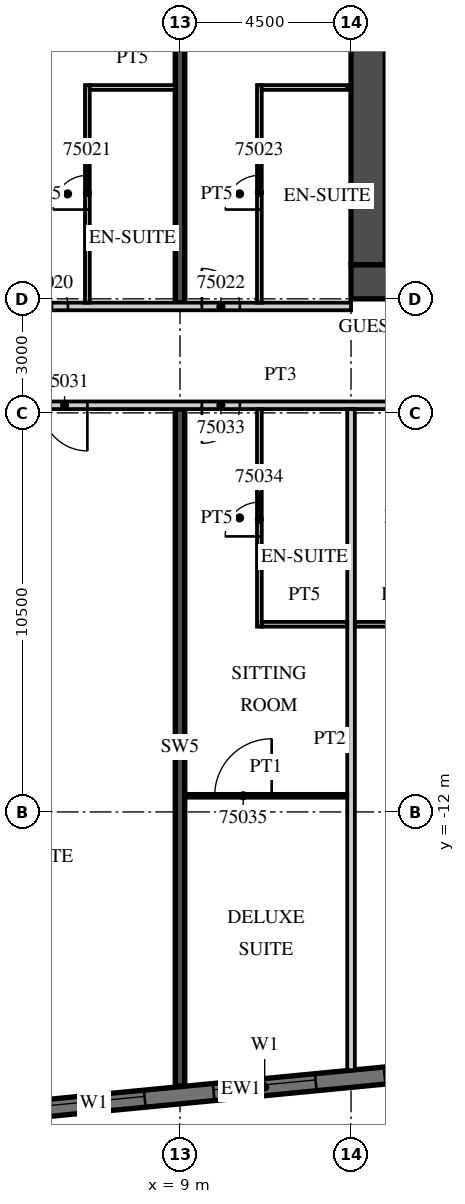
"""IFC4 building model, lengths in metres.
Left out: names, types, materials, properties, quantities, classifications, styles, units other than length and angle.
Written with IfcOpenShell. Run it as: python <this file> out.ifc"""

import sys

from ifc_helpers import new_model, si_unit, direction, frame, frame_2d, origin, place, context, subcontext, project, spatial, rectangle, extrude, element, fill, save


model = new_model("IFC4")
c1 = context("Model", 3, precision=1e-05, world=origin(), true_north=direction((0.0, 1.0)))
c2 = subcontext(c1, "Body", "Model", "MODEL_VIEW")
j1 = project(units=[si_unit("LENGTHUNIT", "METRE"), si_unit("PLANEANGLEUNIT", "RADIAN")], contexts=[c1])
p1 = place(None, origin())
s1 = spatial("IfcSite", under=j1, at=p1, CompositionType="ELEMENT")
p2 = place(p1, origin())
s2 = spatial("IfcBuilding", under=s1, at=p2, CompositionType="ELEMENT")
p3 = place(p2, frame((0.0, 0.0, 298.2)))
s3 = spatial("IfcBuildingStorey", under=s2, at=p3, CompositionType="ELEMENT", Elevation=298.2)
p4 = place(p3, frame((9.0, -19.207, 0.0), z_axis=(0.0, 0.0, 1.0), x_axis=(0.0, 1.0, 0.0)))
e1 = element("IfcWall", 1, at=p4, inside=s3, PredefinedType="SHEAR", context=c2, shape_type="SweptSolid", body=[
    extrude(rectangle(XDim=17.807, YDim=0.25, at=frame_2d((8.904, 0.0))), origin(), (0.0, 0.0, 1.0), 3.3),
])
p5 = place(p3, frame((9.0, 1.4, 0.0), z_axis=(0.0, 0.0, 1.0), x_axis=(0.0, 1.0, 0.0)))
e2 = element("IfcWall", 2, at=p5, inside=s3, PredefinedType="SHEAR", context=c2, shape_type="SweptSolid", body=[
    extrude(rectangle(XDim=18.629, YDim=0.25, at=frame_2d((9.315, 0.0))), origin(), (0.0, 0.0, 1.0), 3.3),
])
p6 = place(p3, frame((-13.521, -21.624, 0.0), z_axis=(0.0, 0.0, 1.0), x_axis=(0.995396186218, 0.095845878695, 0.0)))
e3 = element("IfcWall", 3, at=p6, inside=s3, PredefinedType="SOLIDWALL", context=c2, shape_type="SweptSolid", body=[
    extrude(rectangle(XDim=48.481, YDim=0.45, at=frame_2d((24.241, 0.0))), origin(), (0.0, 0.0, 1.0), 3.02),
])
p7 = place(p6, frame((0.91, 0.0, 0.45)))
e4 = element("IfcOpeningElement", 4, at=p7, cuts=e3, PredefinedType="OPENING", context=c2, shape_type="SweptSolid", body=[
    extrude(rectangle(XDim=2.7, YDim=2.25, at=frame_2d((1.35, 1.125))), frame((0.0, 0.235, 0.0), z_axis=(0.0, -1.0, 0.0), x_axis=(1.0, 0.0, 0.0)), (0.0, 0.0, 1.0), 0.47),
])
p8 = place(p6, frame((5.431, 0.0, 0.45)))
e5 = element("IfcOpeningElement", 5, at=p8, cuts=e3, PredefinedType="OPENING", context=c2, shape_type="SweptSolid", body=[
    extrude(rectangle(XDim=2.7, YDim=2.25, at=frame_2d((1.35, 1.125))), frame((0.0, 0.235, 0.0), z_axis=(0.0, -1.0, 0.0), x_axis=(1.0, 0.0, 0.0)), (0.0, 0.0, 1.0), 0.47),
])
p9 = place(p6, frame((9.952, 0.0, 0.45)))
e6 = element("IfcOpeningElement", 6, at=p9, cuts=e3, PredefinedType="OPENING", context=c2, shape_type="SweptSolid", body=[
    extrude(rectangle(XDim=2.7, YDim=2.25, at=frame_2d((1.35, 1.125))), frame((0.0, 0.235, 0.0), z_axis=(0.0, -1.0, 0.0), x_axis=(1.0, 0.0, 0.0)), (0.0, 0.0, 1.0), 0.47),
])
p10 = place(p6, frame((14.473, 0.0, 0.45)))
e7 = element("IfcOpeningElement", 7, at=p10, cuts=e3, PredefinedType="OPENING", context=c2, shape_type="SweptSolid", body=[
    extrude(rectangle(XDim=2.7, YDim=2.25, at=frame_2d((1.35, 1.125))), frame((0.0, 0.235, 0.0), z_axis=(0.0, -1.0, 0.0), x_axis=(1.0, 0.0, 0.0)), (0.0, 0.0, 1.0), 0.47),
])
p11 = place(p6, frame((18.994, 0.0, 0.45)))
e8 = element("IfcOpeningElement", 8, at=p11, cuts=e3, PredefinedType="OPENING", context=c2, shape_type="SweptSolid", body=[
    extrude(rectangle(XDim=2.7, YDim=2.25, at=frame_2d((1.35, 1.125))), frame((0.0, 0.235, 0.0), z_axis=(0.0, -1.0, 0.0), x_axis=(1.0, 0.0, 0.0)), (0.0, 0.0, 1.0), 0.47),
])
p12 = place(p6, frame((23.514, 0.0, 0.45)))
e9 = element("IfcOpeningElement", 9, at=p12, cuts=e3, PredefinedType="OPENING", context=c2, shape_type="SweptSolid", body=[
    extrude(rectangle(XDim=2.7, YDim=2.25, at=frame_2d((1.35, 1.125))), frame((0.0, 0.235, 0.0), z_axis=(0.0, -1.0, 0.0), x_axis=(1.0, 0.0, 0.0)), (0.0, 0.0, 1.0), 0.47),
])
p13 = place(p6, frame((28.035, 0.0, 0.45)))
e10 = element("IfcOpeningElement", 10, at=p13, cuts=e3, PredefinedType="OPENING", context=c2, shape_type="SweptSolid", body=[
    extrude(rectangle(XDim=2.7, YDim=2.25, at=frame_2d((1.35, 1.125))), frame((0.0, 0.235, 0.0), z_axis=(0.0, -1.0, 0.0), x_axis=(1.0, 0.0, 0.0)), (0.0, 0.0, 1.0), 0.47),
])
p14 = place(p6, frame((32.556, 0.0, 0.45)))
e11 = element("IfcOpeningElement", 11, at=p14, cuts=e3, PredefinedType="OPENING", context=c2, shape_type="SweptSolid", body=[
    extrude(rectangle(XDim=2.7, YDim=2.25, at=frame_2d((1.35, 1.125))), frame((0.0, 0.235, 0.0), z_axis=(0.0, -1.0, 0.0), x_axis=(1.0, 0.0, 0.0)), (0.0, 0.0, 1.0), 0.47),
])
p15 = place(p6, frame((37.077, 0.0, 0.45)))
e12 = element("IfcOpeningElement", 12, at=p15, cuts=e3, PredefinedType="OPENING", context=c2, shape_type="SweptSolid", body=[
    extrude(rectangle(XDim=2.7, YDim=2.25, at=frame_2d((1.35, 1.125))), frame((0.0, 0.235, 0.0), z_axis=(0.0, -1.0, 0.0), x_axis=(1.0, 0.0, 0.0)), (0.0, 0.0, 1.0), 0.47),
])
p16 = place(p6, frame((41.598, 0.0, 0.45)))
e13 = element("IfcOpeningElement", 13, at=p16, cuts=e3, PredefinedType="OPENING", context=c2, shape_type="SweptSolid", body=[
    extrude(rectangle(XDim=2.7, YDim=2.25, at=frame_2d((1.35, 1.125))), frame((0.0, 0.235, 0.0), z_axis=(0.0, -1.0, 0.0), x_axis=(1.0, 0.0, 0.0)), (0.0, 0.0, 1.0), 0.47),
])
p17 = place(p3, frame((-39.909, 1.3, 0.0), z_axis=(0.0, 0.0, 1.0), x_axis=(1.0, 0.0, 0.0)))
e14 = element("IfcWall", 14, at=p17, inside=s3, PredefinedType="PARTITIONING", context=c2, shape_type="SweptSolid", body=[
    extrude(rectangle(XDim=53.409, YDim=0.2, at=frame_2d((26.705, 0.0))), origin(), (0.0, 0.0, 1.0), 3.02),
])
p18 = place(p17, frame((0.255, 0.0, 0.0)))
e15 = element("IfcOpeningElement", 15, at=p18, cuts=e14, PredefinedType="OPENING", context=c2, shape_type="SweptSolid", body=[
    extrude(rectangle(XDim=0.9, YDim=2.1, at=frame_2d((0.45, 1.05))), frame((0.0, 0.11, 0.0), z_axis=(0.0, -1.0, 0.0), x_axis=(1.0, 0.0, 0.0)), (0.0, 0.0, 1.0), 0.22),
])
p19 = place(p17, frame((4.484, 0.0, 0.0)))
e16 = element("IfcOpeningElement", 16, at=p19, cuts=e14, PredefinedType="OPENING", context=c2, shape_type="SweptSolid", body=[
    extrude(rectangle(XDim=1.0, YDim=2.1, at=frame_2d((0.5, 1.05))), frame((0.0, 0.11, 0.0), z_axis=(0.0, -1.0, 0.0), x_axis=(1.0, 0.0, 0.0)), (0.0, 0.0, 1.0), 0.22),
])
p20 = place(p17, frame((11.334, 0.0, 0.0)))
e17 = element("IfcOpeningElement", 17, at=p20, cuts=e14, PredefinedType="OPENING", context=c2, shape_type="SweptSolid", body=[
    extrude(rectangle(XDim=1.0, YDim=2.1, at=frame_2d((0.5, 1.05))), frame((0.0, 0.11, 0.0), z_axis=(0.0, -1.0, 0.0), x_axis=(1.0, 0.0, 0.0)), (0.0, 0.0, 1.0), 0.22),
])
p21 = place(p17, frame((15.347, 0.0, 0.0)))
e18 = element("IfcOpeningElement", 18, at=p21, cuts=e14, PredefinedType="OPENING", context=c2, shape_type="SweptSolid", body=[
    extrude(rectangle(XDim=1.2, YDim=2.1, at=frame_2d((0.6, 1.05))), frame((0.0, 0.11, 0.0), z_axis=(0.0, -1.0, 0.0), x_axis=(1.0, 0.0, 0.0)), (0.0, 0.0, 1.0), 0.22),
])
p22 = place(p17, frame((24.859, 0.0, 0.0)))
e19 = element("IfcOpeningElement", 19, at=p22, cuts=e14, PredefinedType="OPENING", context=c2, shape_type="SweptSolid", body=[
    extrude(rectangle(XDim=1.0, YDim=2.1, at=frame_2d((0.5, 1.05))), frame((0.0, 0.11, 0.0), z_axis=(0.0, -1.0, 0.0), x_axis=(1.0, 0.0, 0.0)), (0.0, 0.0, 1.0), 0.22),
])
p23 = place(p17, frame((26.959, 0.0, 0.0)))
e20 = element("IfcOpeningElement", 20, at=p23, cuts=e14, PredefinedType="OPENING", context=c2, shape_type="SweptSolid", body=[
    extrude(rectangle(XDim=1.0, YDim=2.1, at=frame_2d((0.5, 1.05))), frame((0.0, 0.11, 0.0), z_axis=(0.0, -1.0, 0.0), x_axis=(1.0, 0.0, 0.0)), (0.0, 0.0, 1.0), 0.22),
])
p24 = place(p17, frame((33.346, 0.0, 0.0)))
e21 = element("IfcOpeningElement", 21, at=p24, cuts=e14, PredefinedType="OPENING", context=c2, shape_type="SweptSolid", body=[
    extrude(rectangle(XDim=1.2, YDim=2.1, at=frame_2d((0.6, 1.05))), frame((0.0, 0.11, 0.0), z_axis=(0.0, -1.0, 0.0), x_axis=(1.0, 0.0, 0.0)), (0.0, 0.0, 1.0), 0.22),
])
p25 = place(p17, frame((42.859, 0.0, 0.0)))
e22 = element("IfcOpeningElement", 22, at=p25, cuts=e14, PredefinedType="OPENING", context=c2, shape_type="SweptSolid", body=[
    extrude(rectangle(XDim=1.0, YDim=2.1, at=frame_2d((0.5, 1.05))), frame((0.0, 0.11, 0.0), z_axis=(0.0, -1.0, 0.0), x_axis=(1.0, 0.0, 0.0)), (0.0, 0.0, 1.0), 0.22),
])
p26 = place(p17, frame((44.959, 0.0, 0.0)))
e23 = element("IfcOpeningElement", 23, at=p26, cuts=e14, PredefinedType="OPENING", context=c2, shape_type="SweptSolid", body=[
    extrude(rectangle(XDim=1.0, YDim=2.1, at=frame_2d((0.5, 1.05))), frame((0.0, 0.11, 0.0), z_axis=(0.0, -1.0, 0.0), x_axis=(1.0, 0.0, 0.0)), (0.0, 0.0, 1.0), 0.22),
])
p27 = place(p17, frame((49.484, 0.0, 0.0)))
e24 = element("IfcOpeningElement", 24, at=p27, cuts=e14, PredefinedType="OPENING", context=c2, shape_type="SweptSolid", body=[
    extrude(rectangle(XDim=1.0, YDim=2.1, at=frame_2d((0.5, 1.05))), frame((0.0, 0.11, 0.0), z_axis=(0.0, -1.0, 0.0), x_axis=(1.0, 0.0, 0.0)), (0.0, 0.0, 1.0), 0.22),
])
p28 = place(p3, frame((6.562, 1.4, 0.0), z_axis=(0.0, 0.0, 1.0), x_axis=(0.0, 1.0, 0.0)))
e25 = element("IfcWall", 25, at=p28, inside=s3, PredefinedType="PARTITIONING", context=c2, shape_type="SweptSolid", body=[
    extrude(rectangle(XDim=5.725, YDim=0.125, at=frame_2d((2.863, 0.0))), origin(), (0.0, 0.0, 1.0), 3.02),
])
p29 = place(p28, frame((2.45, 0.0, 0.0)))
e26 = element("IfcOpeningElement", 26, at=p29, cuts=e25, PredefinedType="OPENING", context=c2, shape_type="SweptSolid", body=[
    extrude(rectangle(XDim=0.9, YDim=2.1, at=frame_2d((0.45, 1.05))), frame((0.0, 0.073, 0.0), z_axis=(0.0, -1.0, 0.0), x_axis=(1.0, 0.0, 0.0)), (0.0, 0.0, 1.0), 0.145),
])
p30 = place(p3, frame((6.625, 7.062, 0.0), z_axis=(0.0, 0.0, 1.0), x_axis=(1.0, 0.0, 0.0)))
e27 = element("IfcWall", 27, at=p30, inside=s3, PredefinedType="PARTITIONING", context=c2, shape_type="SweptSolid", body=[
    extrude(rectangle(XDim=2.25, YDim=0.125, at=frame_2d((1.125, 0.0))), origin(), (0.0, 0.0, 1.0), 3.02),
])
p31 = place(p3, frame((11.088, 1.4, 0.0), z_axis=(0.0, 0.0, 1.0), x_axis=(0.0, 1.0, 0.0)))
e28 = element("IfcWall", 28, at=p31, inside=s3, PredefinedType="PARTITIONING", context=c2, shape_type="SweptSolid", body=[
    extrude(rectangle(XDim=5.725, YDim=0.125, at=frame_2d((2.863, 0.0))), origin(), (0.0, 0.0, 1.0), 3.02),
])
p32 = place(p31, frame((2.45, 0.0, 0.0)))
e29 = element("IfcOpeningElement", 29, at=p32, cuts=e28, PredefinedType="OPENING", context=c2, shape_type="SweptSolid", body=[
    extrude(rectangle(XDim=0.9, YDim=2.1, at=frame_2d((0.45, 1.05))), frame((0.0, 0.073, 0.0), z_axis=(0.0, -1.0, 0.0), x_axis=(1.0, 0.0, 0.0)), (0.0, 0.0, 1.0), 0.145),
])
p33 = place(p3, frame((11.15, 7.062, 0.0), z_axis=(0.0, 0.0, 1.0), x_axis=(1.0, 0.0, 0.0)))
e30 = element("IfcWall", 30, at=p33, inside=s3, PredefinedType="PARTITIONING", context=c2, shape_type="SweptSolid", body=[
    extrude(rectangle(XDim=2.25, YDim=0.125, at=frame_2d((1.125, 0.0))), origin(), (0.0, 0.0, 1.0), 3.02),
])
p34 = place(p3, frame((-13.5, -1.3, 0.0), z_axis=(0.0, 0.0, 1.0), x_axis=(1.0, 0.0, 0.0)))
e31 = element("IfcWall", 31, at=p34, inside=s3, PredefinedType="PARTITIONING", context=c2, shape_type="SweptSolid", body=[
    extrude(rectangle(XDim=50.293, YDim=0.2, at=frame_2d((25.146, 0.0))), origin(), (0.0, 0.0, 1.0), 3.02),
])
p35 = place(p34, frame((2.925, 0.0, 0.0)))
e32 = element("IfcOpeningElement", 32, at=p35, cuts=e31, PredefinedType="OPENING", context=c2, shape_type="SweptSolid", body=[
    extrude(rectangle(XDim=1.0, YDim=2.1, at=frame_2d((0.5, 1.05))), frame((0.0, 0.11, 0.0), z_axis=(0.0, -1.0, 0.0), x_axis=(1.0, 0.0, 0.0)), (0.0, 0.0, 1.0), 0.22),
])
p36 = place(p34, frame((7.45, 0.0, 0.0)))
e33 = element("IfcOpeningElement", 33, at=p36, cuts=e31, PredefinedType="OPENING", context=c2, shape_type="SweptSolid", body=[
    extrude(rectangle(XDim=1.0, YDim=2.1, at=frame_2d((0.5, 1.05))), frame((0.0, 0.11, 0.0), z_axis=(0.0, -1.0, 0.0), x_axis=(1.0, 0.0, 0.0)), (0.0, 0.0, 1.0), 0.22),
])
p37 = place(p34, frame((9.55, 0.0, 0.0)))
e34 = element("IfcOpeningElement", 34, at=p37, cuts=e31, PredefinedType="OPENING", context=c2, shape_type="SweptSolid", body=[
    extrude(rectangle(XDim=1.0, YDim=2.1, at=frame_2d((0.5, 1.05))), frame((0.0, 0.11, 0.0), z_axis=(0.0, -1.0, 0.0), x_axis=(1.0, 0.0, 0.0)), (0.0, 0.0, 1.0), 0.22),
])
p38 = place(p34, frame((18.862, 0.0, 0.0)))
e35 = element("IfcOpeningElement", 35, at=p38, cuts=e31, PredefinedType="OPENING", context=c2, shape_type="SweptSolid", body=[
    extrude(rectangle(XDim=1.2, YDim=2.1, at=frame_2d((0.6, 1.05))), frame((0.0, 0.11, 0.0), z_axis=(0.0, -1.0, 0.0), x_axis=(1.0, 0.0, 0.0)), (0.0, 0.0, 1.0), 0.22),
])
p39 = place(p34, frame((23.075, 0.0, 0.0)))
e36 = element("IfcOpeningElement", 36, at=p39, cuts=e31, PredefinedType="OPENING", context=c2, shape_type="SweptSolid", body=[
    extrude(rectangle(XDim=1.0, YDim=2.1, at=frame_2d((0.5, 1.05))), frame((0.0, 0.11, 0.0), z_axis=(0.0, -1.0, 0.0), x_axis=(1.0, 0.0, 0.0)), (0.0, 0.0, 1.0), 0.22),
])
p40 = place(p34, frame((29.925, 0.0, 0.0)))
e37 = element("IfcOpeningElement", 37, at=p40, cuts=e31, PredefinedType="OPENING", context=c2, shape_type="SweptSolid", body=[
    extrude(rectangle(XDim=1.0, YDim=2.1, at=frame_2d((0.5, 1.05))), frame((0.0, 0.11, 0.0), z_axis=(0.0, -1.0, 0.0), x_axis=(1.0, 0.0, 0.0)), (0.0, 0.0, 1.0), 0.22),
])
p41 = place(p34, frame((33.938, 0.0, 0.0)))
e38 = element("IfcOpeningElement", 38, at=p41, cuts=e31, PredefinedType="OPENING", context=c2, shape_type="SweptSolid", body=[
    extrude(rectangle(XDim=1.2, YDim=2.1, at=frame_2d((0.6, 1.05))), frame((0.0, 0.11, 0.0), z_axis=(0.0, -1.0, 0.0), x_axis=(1.0, 0.0, 0.0)), (0.0, 0.0, 1.0), 0.22),
])
p42 = place(p34, frame((43.45, 0.0, 0.0)))
e39 = element("IfcOpeningElement", 39, at=p42, cuts=e31, PredefinedType="OPENING", context=c2, shape_type="SweptSolid", body=[
    extrude(rectangle(XDim=1.0, YDim=2.1, at=frame_2d((0.5, 1.05))), frame((0.0, 0.11, 0.0), z_axis=(0.0, -1.0, 0.0), x_axis=(1.0, 0.0, 0.0)), (0.0, 0.0, 1.0), 0.22),
])
p43 = place(p34, frame((45.55, 0.0, 0.0)))
e40 = element("IfcOpeningElement", 40, at=p43, cuts=e31, PredefinedType="OPENING", context=c2, shape_type="SweptSolid", body=[
    extrude(rectangle(XDim=1.0, YDim=2.1, at=frame_2d((0.5, 1.05))), frame((0.0, 0.11, 0.0), z_axis=(0.0, -1.0, 0.0), x_axis=(1.0, 0.0, 0.0)), (0.0, 0.0, 1.0), 0.22),
])
p44 = place(p3, frame((13.5, -18.796, 0.0), z_axis=(0.0, 0.0, 1.0), x_axis=(0.0, 1.0, 0.0)))
e41 = element("IfcWall", 41, at=p44, inside=s3, PredefinedType="PARTITIONING", context=c2, shape_type="SweptSolid", body=[
    extrude(rectangle(XDim=17.396, YDim=0.2, at=frame_2d((8.698, 0.0))), origin(), (0.0, 0.0, 1.0), 3.02),
])
p45 = place(p3, frame((11.088, -7.125, 0.0), z_axis=(0.0, 0.0, 1.0), x_axis=(0.0, 1.0, 0.0)))
e42 = element("IfcWall", 42, at=p45, inside=s3, PredefinedType="PARTITIONING", context=c2, shape_type="SweptSolid", body=[
    extrude(rectangle(XDim=5.725, YDim=0.125, at=frame_2d((2.863, 0.0))), origin(), (0.0, 0.0, 1.0), 3.02),
])
p46 = place(p45, frame((2.375, 0.0, 0.0)))
e43 = element("IfcOpeningElement", 43, at=p46, cuts=e42, PredefinedType="OPENING", context=c2, shape_type="SweptSolid", body=[
    extrude(rectangle(XDim=0.9, YDim=2.1, at=frame_2d((0.45, 1.05))), frame((0.0, 0.073, 0.0), z_axis=(0.0, -1.0, 0.0), x_axis=(1.0, 0.0, 0.0)), (0.0, 0.0, 1.0), 0.145),
])
p47 = place(p3, frame((11.15, -7.062, 0.0), z_axis=(0.0, 0.0, 1.0), x_axis=(1.0, 0.0, 0.0)))
e44 = element("IfcWall", 44, at=p47, inside=s3, PredefinedType="PARTITIONING", context=c2, shape_type="SweptSolid", body=[
    extrude(rectangle(XDim=2.25, YDim=0.125, at=frame_2d((1.125, 0.0))), origin(), (0.0, 0.0, 1.0), 3.02),
])
p48 = place(p3, frame((9.125, -11.575, 0.0), z_axis=(0.0, 0.0, 1.0), x_axis=(1.0, 0.0, 0.0)))
e45 = element("IfcWall", 45, at=p48, inside=s3, PredefinedType="PARTITIONING", context=c2, shape_type="SweptSolid", body=[
    extrude(rectangle(XDim=4.275, YDim=0.1, at=frame_2d((2.137, 0.0))), origin(), (0.0, 0.0, 1.0), 3.02),
])
p49 = place(p48, frame((0.787, 0.0, 0.0)))
e46 = element("IfcOpeningElement", 46, at=p49, cuts=e45, PredefinedType="OPENING", context=c2, shape_type="SweptSolid", body=[
    extrude(rectangle(XDim=1.5, YDim=2.1, at=frame_2d((0.75, 1.05))), frame((0.0, 0.06, 0.0), z_axis=(0.0, -1.0, 0.0), x_axis=(1.0, 0.0, 0.0)), (0.0, 0.0, 1.0), 0.12),
])
p50 = place(p3, frame((13.6, -7.062, 0.0), z_axis=(0.0, 0.0, 1.0), x_axis=(1.0, 0.0, 0.0)))
e47 = element("IfcWall", 47, at=p50, inside=s3, PredefinedType="PARTITIONING", context=c2, shape_type="SweptSolid", body=[
    extrude(rectangle(XDim=2.25, YDim=0.125, at=frame_2d((1.125, 0.0))), origin(), (0.0, 0.0, 1.0), 3.02),
])
p51 = place(p3, frame((13.5, 1.95, 0.0), z_axis=(0.0, 0.0, 1.0), x_axis=(1.0, 0.0, 0.0)))
e48 = element("IfcWall", 48, at=p51, inside=s3, PredefinedType="SHEAR", context=c2, shape_type="SweptSolid", body=[
    extrude(rectangle(XDim=18.0, YDim=0.9, at=frame_2d((9.0, 0.0))), origin(), (0.0, 0.0, 1.0), 3.02),
])
p52 = place(p51, frame((1.475, 0.0, 0.0)))
e49 = element("IfcOpeningElement", 49, at=p52, cuts=e48, PredefinedType="OPENING", context=c2, shape_type="SweptSolid", body=[
    extrude(rectangle(XDim=1.8, YDim=2.1, at=frame_2d((0.9, 1.05))), frame((0.0, 0.46, 0.0), z_axis=(0.0, -1.0, 0.0), x_axis=(1.0, 0.0, 0.0)), (0.0, 0.0, 1.0), 0.92),
])
p53 = place(p3, frame((13.95, 2.4, 0.0), z_axis=(0.0, 0.0, 1.0), x_axis=(0.0, 1.0, 0.0)))
e50 = element("IfcWall", 50, at=p53, inside=s3, PredefinedType="SHEAR", context=c2, shape_type="SweptSolid", body=[
    extrude(rectangle(XDim=12.2, YDim=0.9, at=frame_2d((6.1, 0.0))), origin(), (0.0, 0.0, 1.0), 3.02),
])
p54 = place(p11, origin())
e51 = element("IfcWindow", 51, at=p54, inside=s3, PartitioningType="SINGLE_PANEL", PredefinedType="WINDOW", context=c2, shape_type="SweptSolid", body=[
    extrude(rectangle(XDim=2.7, YDim=2.25, at=frame_2d((1.35, 1.125))), frame((0.0, 0.09, 0.0), z_axis=(0.0, -1.0, 0.0), x_axis=(1.0, 0.0, 0.0)), (0.0, 0.0, 1.0), 0.06),
])
fill(e8, e51)
p55 = place(p12, origin())
e52 = element("IfcWindow", 52, at=p55, inside=s3, PartitioningType="SINGLE_PANEL", PredefinedType="WINDOW", context=c2, shape_type="SweptSolid", body=[
    extrude(rectangle(XDim=2.7, YDim=2.25, at=frame_2d((1.35, 1.125))), frame((0.0, 0.09, 0.0), z_axis=(0.0, -1.0, 0.0), x_axis=(1.0, 0.0, 0.0)), (0.0, 0.0, 1.0), 0.06),
])
fill(e9, e52)
p56 = place(p13, origin())
e53 = element("IfcWindow", 53, at=p56, inside=s3, PartitioningType="SINGLE_PANEL", PredefinedType="WINDOW", context=c2, shape_type="SweptSolid", body=[
    extrude(rectangle(XDim=2.7, YDim=2.25, at=frame_2d((1.35, 1.125))), frame((0.0, 0.09, 0.0), z_axis=(0.0, -1.0, 0.0), x_axis=(1.0, 0.0, 0.0)), (0.0, 0.0, 1.0), 0.06),
])
fill(e10, e53)
p57 = place(p26, origin())
e54 = element("IfcDoor", 54, at=p57, inside=s3, OperationType="SINGLE_SWING_LEFT", PredefinedType="DOOR", context=c2, shape_type="SweptSolid", body=[
    extrude(rectangle(XDim=1.0, YDim=2.1, at=frame_2d((0.5, 1.05))), frame((0.0, 0.025, 0.0), z_axis=(0.0, -1.0, 0.0), x_axis=(1.0, 0.0, 0.0)), (0.0, 0.0, 1.0), 0.05),
])
fill(e23, e54)
p58 = place(p29, origin())
e55 = element("IfcDoor", 55, at=p58, inside=s3, OperationType="SINGLE_SWING_LEFT", PredefinedType="DOOR", context=c2, shape_type="SweptSolid", body=[
    extrude(rectangle(XDim=0.9, YDim=2.1, at=frame_2d((0.45, 1.05))), frame((0.0, 0.025, 0.0), z_axis=(0.0, -1.0, 0.0), x_axis=(1.0, 0.0, 0.0)), (0.0, 0.0, 1.0), 0.05),
])
fill(e26, e55)
p59 = place(p27, origin())
e56 = element("IfcDoor", 56, at=p59, inside=s3, OperationType="SINGLE_SWING_LEFT", PredefinedType="DOOR", context=c2, shape_type="SweptSolid", body=[
    extrude(rectangle(XDim=1.0, YDim=2.1, at=frame_2d((0.5, 1.05))), frame((0.0, 0.025, 0.0), z_axis=(0.0, -1.0, 0.0), x_axis=(1.0, 0.0, 0.0)), (0.0, 0.0, 1.0), 0.05),
])
fill(e24, e56)
p60 = place(p32, origin())
e57 = element("IfcDoor", 57, at=p60, inside=s3, OperationType="SINGLE_SWING_LEFT", PredefinedType="DOOR", context=c2, shape_type="SweptSolid", body=[
    extrude(rectangle(XDim=0.9, YDim=2.1, at=frame_2d((0.45, 1.05))), frame((0.0, 0.025, 0.0), z_axis=(0.0, -1.0, 0.0), x_axis=(1.0, 0.0, 0.0)), (0.0, 0.0, 1.0), 0.05),
])
fill(e29, e57)
p61 = place(p38, origin())
e58 = element("IfcDoor", 58, at=p61, inside=s3, OperationType="SINGLE_SWING_RIGHT", PredefinedType="DOOR", context=c2, shape_type="SweptSolid", body=[
    extrude(rectangle(XDim=1.2, YDim=2.1, at=frame_2d((0.6, 1.05))), frame((0.0, 0.025, 0.0), z_axis=(0.0, -1.0, 0.0), x_axis=(1.0, 0.0, 0.0)), (0.0, 0.0, 1.0), 0.05),
])
fill(e35, e58)
p62 = place(p39, origin())
e59 = element("IfcDoor", 59, at=p62, inside=s3, OperationType="SINGLE_SWING_LEFT", PredefinedType="DOOR", context=c2, shape_type="SweptSolid", body=[
    extrude(rectangle(XDim=1.0, YDim=2.1, at=frame_2d((0.5, 1.05))), frame((0.0, 0.025, 0.0), z_axis=(0.0, -1.0, 0.0), x_axis=(1.0, 0.0, 0.0)), (0.0, 0.0, 1.0), 0.05),
])
fill(e36, e59)
p63 = place(p46, origin())
e60 = element("IfcDoor", 60, at=p63, inside=s3, OperationType="SINGLE_SWING_LEFT", PredefinedType="DOOR", context=c2, shape_type="SweptSolid", body=[
    extrude(rectangle(XDim=0.9, YDim=2.1, at=frame_2d((0.45, 1.05))), frame((0.0, 0.025, 0.0), z_axis=(0.0, -1.0, 0.0), x_axis=(1.0, 0.0, 0.0)), (0.0, 0.0, 1.0), 0.05),
])
fill(e43, e60)
p64 = place(p49, origin())
e61 = element("IfcDoor", 61, at=p64, inside=s3, OperationType="SINGLE_SWING_RIGHT", PredefinedType="DOOR", context=c2, shape_type="SweptSolid", body=[
    extrude(rectangle(XDim=1.5, YDim=2.1, at=frame_2d((0.75, 1.05))), frame((0.0, 0.025, 0.0), z_axis=(0.0, -1.0, 0.0), x_axis=(1.0, 0.0, 0.0)), (0.0, 0.0, 1.0), 0.05),
])
fill(e46, e61)
save(model, sys.argv[1])
